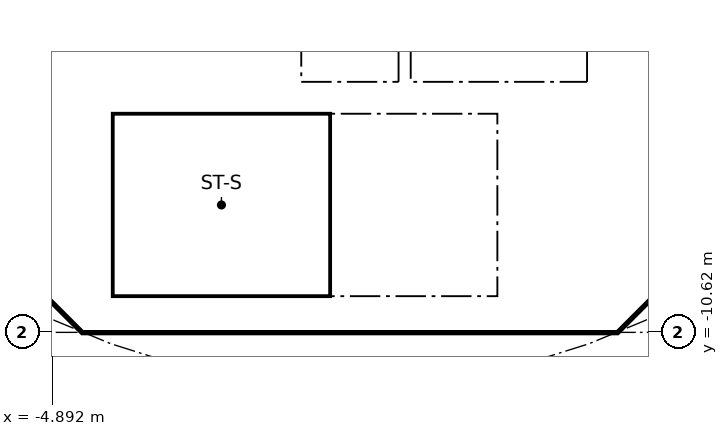
"""IFC4 building model, lengths in metres.
Left out: names, types, materials, properties, quantities, classifications, styles, units other than length and angle.
Written with IfcOpenShell. Run it as: python <this file> out.ifc"""

import sys

from ifc_helpers import new_model, si_unit, direction, frame, frame_2d, origin, place, context, subcontext, project, spatial, polyline, rectangle, outline, extrude, element, fill, save


model = new_model("IFC4")
c1 = context("Model", 3, precision=1e-05, world=origin(), true_north=direction((0.0, 1.0)))
c2 = subcontext(c1, "Body", "Model", "MODEL_VIEW")
j1 = project(units=[si_unit("LENGTHUNIT", "METRE"), si_unit("PLANEANGLEUNIT", "RADIAN")], contexts=[c1])
p1 = place(None, origin())
s1 = spatial("IfcSite", under=j1, at=p1, CompositionType="ELEMENT")
p2 = place(p1, origin())
s2 = spatial("IfcBuilding", under=s1, at=p2, CompositionType="ELEMENT")
p3 = place(p2, frame((0.0, 0.0, 84.4)))
s3 = spatial("IfcBuildingStorey", under=s2, at=p3, CompositionType="ELEMENT", Elevation=84.4)
p4 = place(p3, frame((-9.988, -4.613, 0.0), z_axis=(0.0, 0.0, 1.0), x_axis=(0.707106781187, -0.707106781187, 0.0)))
e1 = element("IfcWall", 1, at=p4, inside=s3, PredefinedType="SHEAR", context=c2, shape_type="SweptSolid", body=[
    extrude(rectangle(XDim=7.602, YDim=0.6, at=frame_2d((3.801, 0.0))), origin(), (0.0, 0.0, 1.0), 3.44),
])
p5 = place(p4, frame((6.151, 0.0, 0.0)))
e2 = element("IfcOpeningElement", 2, at=p5, cuts=e1, PredefinedType="OPENING", context=c2, shape_type="SweptSolid", body=[
    extrude(rectangle(XDim=1.1, YDim=2.1, at=frame_2d((0.55, 1.05))), frame((0.0, 0.31, 0.0), z_axis=(0.0, -1.0, 0.0), x_axis=(1.0, 0.0, 0.0)), (0.0, 0.0, 1.0), 0.62),
])
p6 = place(p3, frame((4.613, -9.988, 0.0), z_axis=(0.0, 0.0, 1.0), x_axis=(0.707106781187, 0.707106781187, 0.0)))
e3 = element("IfcWall", 3, at=p6, inside=s3, PredefinedType="SHEAR", context=c2, shape_type="SweptSolid", body=[
    extrude(rectangle(XDim=7.602, YDim=0.6, at=frame_2d((3.801, 0.0))), origin(), (0.0, 0.0, 1.0), 3.44),
])
p7 = place(p6, frame((3.201, 0.0, 0.0)))
e4 = element("IfcOpeningElement", 4, at=p7, cuts=e3, PredefinedType="OPENING", context=c2, shape_type="SweptSolid", body=[
    extrude(rectangle(XDim=1.2, YDim=2.1, at=frame_2d((0.6, 1.05))), frame((0.0, 0.31, 0.0), z_axis=(0.0, -1.0, 0.0), x_axis=(1.0, 0.0, 0.0)), (0.0, 0.0, 1.0), 0.62),
])
p8 = place(p3, frame((4.0, -10.025, 0.0), z_axis=(0.0, 0.0, 1.0), x_axis=(0.0, 1.0, 0.0)))
e5 = element("IfcWall", 5, at=p8, inside=s3, PredefinedType="SOLIDWALL", context=c2, shape_type="SweptSolid", body=[
    extrude(rectangle(XDim=3.0, YDim=0.2, at=frame_2d((1.5, 0.0))), origin(), (0.0, 0.0, 1.0), 3.44),
])
p9 = place(p8, frame((0.975, 0.0, 0.0)))
e6 = element("IfcOpeningElement", 6, at=p9, cuts=e5, PredefinedType="OPENING", context=c2, shape_type="SweptSolid", body=[
    extrude(rectangle(XDim=1.1, YDim=2.1, at=frame_2d((0.55, 1.05))), frame((0.0, 0.11, 0.0), z_axis=(0.0, -1.0, 0.0), x_axis=(1.0, 0.0, 0.0)), (0.0, 0.0, 1.0), 0.22),
])
p10 = place(p3, frame((4.0, -6.5, 0.0), z_axis=(0.0, 0.0, 1.0), x_axis=(0.0, 1.0, 0.0)))
e7 = element("IfcWall", 7, at=p10, inside=s3, PredefinedType="SOLIDWALL", context=c2, shape_type="SweptSolid", body=[
    extrude(rectangle(XDim=2.2, YDim=0.2, at=frame_2d((1.1, 0.0))), origin(), (0.0, 0.0, 1.0), 3.44),
])
p11 = place(p10, frame((0.55, 0.0, 0.0)))
e8 = element("IfcOpeningElement", 8, at=p11, cuts=e7, PredefinedType="OPENING", context=c2, shape_type="SweptSolid", body=[
    extrude(rectangle(XDim=1.1, YDim=2.1, at=frame_2d((0.55, 1.05))), frame((0.0, 0.11, 0.0), z_axis=(0.0, -1.0, 0.0), x_axis=(1.0, 0.0, 0.0)), (0.0, 0.0, 1.0), 0.22),
])
p12 = place(p3, frame((-4.0, -6.5, 0.0), z_axis=(0.0, 0.0, 1.0), x_axis=(0.0, 1.0, 0.0)))
e9 = element("IfcWall", 9, at=p12, inside=s3, PredefinedType="SOLIDWALL", context=c2, shape_type="SweptSolid", body=[
    extrude(rectangle(XDim=2.2, YDim=0.2, at=frame_2d((1.1, 0.0))), origin(), (0.0, 0.0, 1.0), 3.44),
])
p13 = place(p12, frame((0.65, 0.0, 0.0)))
e10 = element("IfcOpeningElement", 10, at=p13, cuts=e9, PredefinedType="OPENING", context=c2, shape_type="SweptSolid", body=[
    extrude(rectangle(XDim=0.9, YDim=2.1, at=frame_2d((0.45, 1.05))), frame((0.0, 0.11, 0.0), z_axis=(0.0, -1.0, 0.0), x_axis=(1.0, 0.0, 0.0)), (0.0, 0.0, 1.0), 0.22),
])
p14 = place(p3, origin())
e11 = element("IfcWall", 11, at=p14, inside=s3, PredefinedType="SHEAR", context=c2, shape_type="SweptSolid", body=[
    extrude(outline(polyline([(-4.152, -10.025), (4.152, -10.025), (4.401, -9.776), (4.825, -10.2), (4.401, -10.625), (-4.401, -10.625), (-4.825, -10.2), (-4.401, -9.776), (-4.152, -10.025)])), origin(), (0.0, 0.0, 1.0), 3.44),
])
for number, where, z_axis, x_axis in (
    (12, (-0.9, -6.5, 0.0), (0.0, 0.0, 1.0), (0.0, 1.0, 0.0)),
    (13, (0.9, -6.5, 0.0), (0.0, 0.0, 1.0), (0.0, 1.0, 0.0)),
):
    element("IfcWall", number, at=place(p3, frame(where, z_axis=z_axis, x_axis=x_axis)), inside=s3, PredefinedType="SOLIDWALL", context=c2, shape_type="SweptSolid", body=[
        extrude(rectangle(XDim=2.2, YDim=0.2, at=frame_2d((1.1, 0.0))), origin(), (0.0, 0.0, 1.0), 3.44),
    ])
p15 = place(p3, origin())
e14 = element("IfcWall", 14, at=p15, inside=s3, PredefinedType="SOLIDWALL", context=c2, shape_type="SweptSolid", body=[
    extrude(outline(polyline([(-3.9, -10.025), (-4.1, -10.025), (-4.1, -7.025), (-3.9, -7.025), (-3.9, -10.025)])), origin(), (0.0, 0.0, 1.0), 3.44),
])
p16 = place(p3, origin())
e15 = element("IfcWall", 15, at=p16, inside=s3, PredefinedType="SOLIDWALL", context=c2, shape_type="SweptSolid", body=[
    extrude(outline(polyline([(4.1, -7.025), (-4.1, -7.025), (-4.1, -6.5), (4.1, -6.5), (4.1, -7.025)])), origin(), (0.0, 0.0, 1.0), 3.44),
])
p17 = place(p9, origin())
e16 = element("IfcDoor", 16, at=p17, inside=s3, OperationType="SINGLE_SWING_LEFT", PredefinedType="DOOR", context=c2, shape_type="SweptSolid", body=[
    extrude(rectangle(XDim=1.1, YDim=2.1, at=frame_2d((0.55, 1.05))), frame((0.0, 0.025, 0.0), z_axis=(0.0, -1.0, 0.0), x_axis=(1.0, 0.0, 0.0)), (0.0, 0.0, 1.0), 0.05),
])
fill(e6, e16)
p18 = place(p5, origin())
e17 = element("IfcDoor", 17, at=p18, inside=s3, OperationType="SINGLE_SWING_LEFT", PredefinedType="DOOR", context=c2, shape_type="SweptSolid", body=[
    extrude(rectangle(XDim=1.1, YDim=2.1, at=frame_2d((0.55, 1.05))), frame((0.0, 0.025, 0.0), z_axis=(0.0, -1.0, 0.0), x_axis=(1.0, 0.0, 0.0)), (0.0, 0.0, 1.0), 0.05),
])
fill(e2, e17)
save(model, sys.argv[1])
